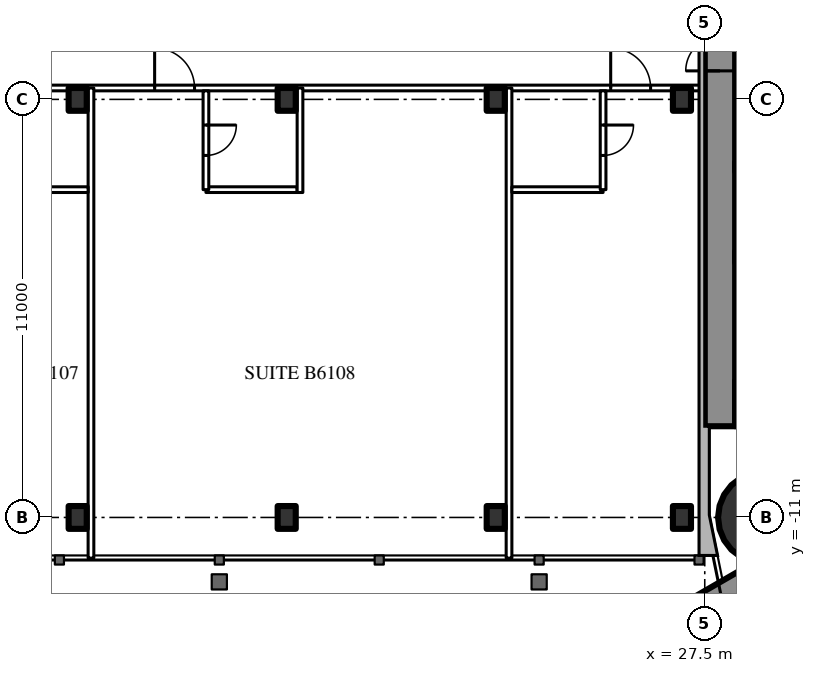
"""IFC4 building model, lengths in metres.
Left out: names, types, materials, properties, quantities, classifications, styles, units other than length and angle.
Written with IfcOpenShell. Run it as: python <this file> out.ifc"""

import sys

from ifc_helpers import new_model, si_unit, direction, frame, frame_2d, origin, origin_2d, place, context, subcontext, project, spatial, rectangle, circle, i_section, extrude, element, fill, save


model = new_model("IFC4")
c1 = context("Model", 3, precision=1e-05, world=origin(), true_north=direction((0.0, 1.0)))
c2 = subcontext(c1, "Body", "Model", "MODEL_VIEW")
j1 = project(units=[si_unit("LENGTHUNIT", "METRE"), si_unit("PLANEANGLEUNIT", "RADIAN")], contexts=[c1])
p1 = place(None, origin())
s1 = spatial("IfcSite", under=j1, at=p1, CompositionType="ELEMENT")
p2 = place(p1, origin())
s2 = spatial("IfcBuilding", under=s1, at=p2, CompositionType="ELEMENT")
p3 = place(p2, frame((0.0, 0.0, 229.7)))
s3 = spatial("IfcBuildingStorey", under=s2, at=p3, CompositionType="ELEMENT", Elevation=229.7)
p4 = place(p3, frame((29.05, -11.0, 0.0), z_axis=(0.0, 0.0, 1.0), x_axis=(1.0, 0.0, 0.0)))
e1 = element("IfcColumn", 1, at=p4, inside=s3, PredefinedType="COLUMN", context=c2, shape_type="SweptSolid", body=[
    extrude(circle(Radius=1.2, at=origin_2d()), origin(), (0.0, 0.0, 1.0), 3.6),
])
p5 = place(p3, frame((27.9, -8.6, 0.0), z_axis=(0.0, 0.0, 1.0), x_axis=(0.0, 1.0, 0.0)))
e2 = element("IfcWall", 2, at=p5, inside=s3, PredefinedType="SHEAR", context=c2, shape_type="SweptSolid", body=[
    extrude(rectangle(XDim=17.2, YDim=0.8, at=frame_2d((8.6, 0.0))), origin(), (0.0, 0.0, 1.0), 3.6),
])
p6 = place(p5, frame((9.35, 0.0, 0.0)))
e3 = element("IfcOpeningElement", 3, at=p6, cuts=e2, PredefinedType="OPENING", context=c2, shape_type="SweptSolid", body=[
    extrude(rectangle(XDim=0.9, YDim=2.2, at=frame_2d((0.45, 1.1))), frame((0.0, 0.41, 0.0), z_axis=(0.0, -1.0, 0.0), x_axis=(1.0, 0.0, 0.0)), (0.0, 0.0, 1.0), 0.82),
])
p7 = place(p3, frame((28.3, -8.0, 0.0), z_axis=(0.0, 0.0, 1.0), x_axis=(1.0, 0.0, 0.0)))
e4 = element("IfcWall", 4, at=p7, inside=s3, PredefinedType="SHEAR", context=c2, shape_type="SweptSolid", body=[
    extrude(rectangle(XDim=8.4, YDim=1.2, at=frame_2d((4.2, 0.0))), origin(), (0.0, 0.0, 1.0), 3.6),
])
p8 = place(p7, frame((0.25, 0.0, 0.0)))
e5 = element("IfcOpeningElement", 5, at=p8, cuts=e4, PredefinedType="OPENING", context=c2, shape_type="SweptSolid", body=[
    extrude(rectangle(XDim=1.0, YDim=2.2, at=frame_2d((0.5, 1.1))), frame((0.0, 0.61, 0.0), z_axis=(0.0, -1.0, 0.0), x_axis=(1.0, 0.0, 0.0)), (0.0, 0.0, 1.0), 1.22),
])
p9 = place(p3, frame((28.3, -4.15, 0.0), z_axis=(0.0, 0.0, 1.0), x_axis=(1.0, 0.0, 0.0)))
e6 = element("IfcWall", 6, at=p9, inside=s3, PredefinedType="SHEAR", context=c2, shape_type="SweptSolid", body=[
    extrude(rectangle(XDim=8.4, YDim=0.3, at=frame_2d((4.2, 0.0))), origin(), (0.0, 0.0, 1.0), 3.6),
])
p10 = place(p3, frame((28.3, -1.775, 0.0), z_axis=(0.0, 0.0, 1.0), x_axis=(1.0, 0.0, 0.0)))
e7 = element("IfcWall", 7, at=p10, inside=s3, PredefinedType="SHEAR", context=c2, shape_type="SweptSolid", body=[
    extrude(rectangle(XDim=2.9, YDim=0.25, at=frame_2d((1.45, 0.0))), origin(), (0.0, 0.0, 1.0), 3.6),
])
p11 = place(p3, frame((27.2, -13.8, 0.0), z_axis=(0.0, 0.0, 1.0), x_axis=(0.866027159892, 0.499996958321, 0.0)))
e8 = element("IfcWall", 8, at=p11, inside=s3, PredefinedType="SHEAR", context=c2, shape_type="SweptSolid", body=[
    extrude(rectangle(XDim=27.947, YDim=1.2, at=frame_2d((13.973, 0.0))), origin(), (0.0, 0.0, 1.0), 3.6),
])
p12 = place(p11, frame((4.6, 0.0, 0.0)))
e9 = element("IfcOpeningElement", 9, at=p12, cuts=e8, PredefinedType="OPENING", context=c2, shape_type="SweptSolid", body=[
    extrude(rectangle(XDim=1.0, YDim=2.2, at=frame_2d((0.5, 1.1))), frame((0.0, 0.61, 0.0), z_axis=(0.0, -1.0, 0.0), x_axis=(1.0, 0.0, 0.0)), (0.0, 0.0, 1.0), 1.22),
])
p13 = place(p11, frame((13.395, 0.0, 0.0)))
e10 = element("IfcOpeningElement", 10, at=p13, cuts=e8, PredefinedType="OPENING", context=c2, shape_type="SweptSolid", body=[
    extrude(rectangle(XDim=1.8, YDim=2.2, at=frame_2d((0.9, 1.1))), frame((0.0, 0.61, 0.0), z_axis=(0.0, -1.0, 0.0), x_axis=(1.0, 0.0, 0.0)), (0.0, 0.0, 1.0), 1.22),
])
p14 = place(p3, frame((27.2, 13.8, 0.0), z_axis=(0.0, 0.0, 1.0), x_axis=(0.866024515034, -0.500001539357, 0.0)))
e11 = element("IfcWall", 11, at=p14, inside=s3, PredefinedType="SHEAR", context=c2, shape_type="SweptSolid", body=[
    extrude(rectangle(XDim=26.907, YDim=1.2, at=frame_2d((13.454, 0.0))), origin(), (0.0, 0.0, 1.0), 3.6),
])
p15 = place(p14, frame((4.6, 0.0, 0.0)))
e12 = element("IfcOpeningElement", 12, at=p15, cuts=e11, PredefinedType="OPENING", context=c2, shape_type="SweptSolid", body=[
    extrude(rectangle(XDim=1.0, YDim=2.2, at=frame_2d((0.5, 1.1))), frame((0.0, 0.61, 0.0), z_axis=(0.0, -1.0, 0.0), x_axis=(1.0, 0.0, 0.0)), (0.0, 0.0, 1.0), 1.22),
])
p16 = place(p14, frame((13.395, 0.0, 0.0)))
e13 = element("IfcOpeningElement", 13, at=p16, cuts=e11, PredefinedType="OPENING", context=c2, shape_type="SweptSolid", body=[
    extrude(rectangle(XDim=1.8, YDim=2.2, at=frame_2d((0.9, 1.1))), frame((0.0, 0.61, 0.0), z_axis=(0.0, -1.0, 0.0), x_axis=(1.0, 0.0, 0.0)), (0.0, 0.0, 1.0), 1.22),
])
for number, where, z_axis, x_axis in (
    (14, (11.0, -11.0, 0.0), (0.0, 0.0, 1.0), (1.0, 0.0, 0.0)),
    (15, (16.5, -11.0, 0.0), (0.0, 0.0, 1.0), (1.0, 0.0, 0.0)),
    (16, (22.0, -11.0, 0.0), (0.0, 0.0, 1.0), (1.0, 0.0, 0.0)),
    (17, (26.9, -11.0, 0.0), (0.0, 0.0, 1.0), (1.0, 0.0, 0.0)),
    (18, (11.0, 0.0, 0.0), (0.0, 0.0, 1.0), (1.0, 0.0, 0.0)),
    (19, (16.5, 0.0, 0.0), (0.0, 0.0, 1.0), (1.0, 0.0, 0.0)),
    (20, (22.0, 0.0, 0.0), (0.0, 0.0, 1.0), (1.0, 0.0, 0.0)),
    (21, (26.9, 0.0, 0.0), (0.0, 0.0, 1.0), (1.0, 0.0, 0.0)),
):
    element("IfcColumn", number, at=place(p3, frame(where, z_axis=z_axis, x_axis=x_axis)), inside=s3, PredefinedType="COLUMN", context=c2, shape_type="SweptSolid", body=[
        extrude(i_section(OverallWidth=0.476, OverallDepth=0.6, WebThickness=0.1, FlangeThickness=0.14, FilletRadius=0.02, at=origin_2d()), origin(), (0.0, 0.0, 1.0), 3.6),
    ])
p17 = place(p3, frame((-27.5, 0.3, 0.0), z_axis=(0.0, 0.0, 1.0), x_axis=(1.0, 0.0, 0.0)))
e22 = element("IfcWall", 22, at=p17, inside=s3, PredefinedType="PARTITIONING", context=c2, shape_type="SweptSolid", body=[
    extrude(rectangle(XDim=55.0, YDim=0.15, at=frame_2d((27.5, 0.0))), origin(), (0.0, 0.0, 1.0), 2.4),
])
p18 = place(p17, frame((1.575, 0.0, 0.0)))
e23 = element("IfcOpeningElement", 23, at=p18, cuts=e22, PredefinedType="OPENING", context=c2, shape_type="SweptSolid", body=[
    extrude(rectangle(XDim=1.0, YDim=2.2, at=frame_2d((0.5, 1.1))), frame((0.0, 0.085, 0.0), z_axis=(0.0, -1.0, 0.0), x_axis=(1.0, 0.0, 0.0)), (0.0, 0.0, 1.0), 0.17),
])
p19 = place(p17, frame((7.525, 0.0, 0.0)))
e24 = element("IfcOpeningElement", 24, at=p19, cuts=e22, PredefinedType="OPENING", context=c2, shape_type="SweptSolid", body=[
    extrude(rectangle(XDim=1.05, YDim=2.4, at=frame_2d((0.525, 1.2))), frame((0.0, 0.085, 0.0), z_axis=(0.0, -1.0, 0.0), x_axis=(1.0, 0.0, 0.0)), (0.0, 0.0, 1.0), 0.17),
])
p20 = place(p17, frame((18.525, 0.0, 0.0)))
e25 = element("IfcOpeningElement", 25, at=p20, cuts=e22, PredefinedType="OPENING", context=c2, shape_type="SweptSolid", body=[
    extrude(rectangle(XDim=1.05, YDim=2.4, at=frame_2d((0.525, 1.2))), frame((0.0, 0.085, 0.0), z_axis=(0.0, -1.0, 0.0), x_axis=(1.0, 0.0, 0.0)), (0.0, 0.0, 1.0), 0.17),
])
p21 = place(p17, frame((24.025, 0.0, 0.0)))
e26 = element("IfcOpeningElement", 26, at=p21, cuts=e22, PredefinedType="OPENING", context=c2, shape_type="SweptSolid", body=[
    extrude(rectangle(XDim=1.05, YDim=2.4, at=frame_2d((0.525, 1.2))), frame((0.0, 0.085, 0.0), z_axis=(0.0, -1.0, 0.0), x_axis=(1.0, 0.0, 0.0)), (0.0, 0.0, 1.0), 0.17),
])
p22 = place(p17, frame((35.025, 0.0, 0.0)))
e27 = element("IfcOpeningElement", 27, at=p22, cuts=e22, PredefinedType="OPENING", context=c2, shape_type="SweptSolid", body=[
    extrude(rectangle(XDim=1.05, YDim=2.4, at=frame_2d((0.525, 1.2))), frame((0.0, 0.085, 0.0), z_axis=(0.0, -1.0, 0.0), x_axis=(1.0, 0.0, 0.0)), (0.0, 0.0, 1.0), 0.17),
])
p23 = place(p17, frame((40.525, 0.0, 0.0)))
e28 = element("IfcOpeningElement", 28, at=p23, cuts=e22, PredefinedType="OPENING", context=c2, shape_type="SweptSolid", body=[
    extrude(rectangle(XDim=1.05, YDim=2.4, at=frame_2d((0.525, 1.2))), frame((0.0, 0.085, 0.0), z_axis=(0.0, -1.0, 0.0), x_axis=(1.0, 0.0, 0.0)), (0.0, 0.0, 1.0), 0.17),
])
p24 = place(p17, frame((52.525, 0.0, 0.0)))
e29 = element("IfcOpeningElement", 29, at=p24, cuts=e22, PredefinedType="OPENING", context=c2, shape_type="SweptSolid", body=[
    extrude(rectangle(XDim=1.05, YDim=2.4, at=frame_2d((0.525, 1.2))), frame((0.0, 0.085, 0.0), z_axis=(0.0, -1.0, 0.0), x_axis=(1.0, 0.0, 0.0)), (0.0, 0.0, 1.0), 0.17),
])
for number, where, z_axis, x_axis in (
    (30, (11.35, -12.07, 0.0), (0.0, 0.0, 1.0), (0.0, 1.0, 0.0)),
    (31, (22.35, -12.07, 0.0), (0.0, 0.0, 1.0), (0.0, 1.0, 0.0)),
):
    element("IfcWall", number, at=place(p3, frame(where, z_axis=z_axis, x_axis=x_axis)), inside=s3, PredefinedType="PARTITIONING", context=c2, shape_type="SweptSolid", body=[
        extrude(rectangle(XDim=12.37, YDim=0.15, at=frame_2d((6.185, 0.0))), origin(), (0.0, 0.0, 1.0), 3.4),
    ])
for number, where, z_axis, x_axis in (
    (32, (8.875, -2.375, 0.0), (0.0, 0.0, 1.0), (1.0, 0.0, 0.0)),
    (33, (14.375, -2.375, 0.0), (0.0, 0.0, 1.0), (1.0, 0.0, 0.0)),
):
    element("IfcWall", number, at=place(p3, frame(where, z_axis=z_axis, x_axis=x_axis)), inside=s3, PredefinedType="PARTITIONING", context=c2, shape_type="SweptSolid", body=[
        extrude(rectangle(XDim=2.4, YDim=0.15, at=frame_2d((1.2, 0.0))), origin(), (0.0, 0.0, 1.0), 3.4),
    ])
p25 = place(p3, frame((14.375, -2.375, 0.0), z_axis=(0.0, 0.0, 1.0), x_axis=(0.0, 1.0, 0.0)))
e34 = element("IfcWall", 34, at=p25, inside=s3, PredefinedType="PARTITIONING", context=c2, shape_type="SweptSolid", body=[
    extrude(rectangle(XDim=2.6, YDim=0.15, at=frame_2d((1.3, 0.0))), origin(), (0.0, 0.0, 1.0), 3.4),
])
p26 = place(p25, frame((0.9, 0.0, 0.0)))
e35 = element("IfcOpeningElement", 35, at=p26, cuts=e34, PredefinedType="OPENING", context=c2, shape_type="SweptSolid", body=[
    extrude(rectangle(XDim=0.8, YDim=2.2, at=frame_2d((0.4, 1.1))), frame((0.0, 0.085, 0.0), z_axis=(0.0, -1.0, 0.0), x_axis=(1.0, 0.0, 0.0)), (0.0, 0.0, 1.0), 0.17),
])
p27 = place(p3, frame((22.425, -2.375, 0.0), z_axis=(0.0, 0.0, 1.0), x_axis=(1.0, 0.0, 0.0)))
e36 = element("IfcWall", 36, at=p27, inside=s3, PredefinedType="PARTITIONING", context=c2, shape_type="SweptSolid", body=[
    extrude(rectangle(XDim=2.4, YDim=0.15, at=frame_2d((1.2, 0.0))), origin(), (0.0, 0.0, 1.0), 3.4),
])
p28 = place(p3, frame((24.825, -2.375, 0.0), z_axis=(0.0, 0.0, 1.0), x_axis=(0.0, 1.0, 0.0)))
e37 = element("IfcWall", 37, at=p28, inside=s3, PredefinedType="PARTITIONING", context=c2, shape_type="SweptSolid", body=[
    extrude(rectangle(XDim=2.6, YDim=0.15, at=frame_2d((1.3, 0.0))), origin(), (0.0, 0.0, 1.0), 3.4),
])
p29 = place(p28, frame((0.9, 0.0, 0.0)))
e38 = element("IfcOpeningElement", 38, at=p29, cuts=e37, PredefinedType="OPENING", context=c2, shape_type="SweptSolid", body=[
    extrude(rectangle(XDim=0.8, YDim=2.2, at=frame_2d((0.4, 1.1))), frame((0.0, 0.085, 0.0), z_axis=(0.0, -1.0, 0.0), x_axis=(1.0, 0.0, 0.0)), (0.0, 0.0, 1.0), 0.17),
])
p30 = place(p3, frame((16.85, -2.45, 0.0), z_axis=(0.0, 0.0, 1.0), x_axis=(0.0, 1.0, 0.0)))
e39 = element("IfcWall", 39, at=p30, inside=s3, PredefinedType="PARTITIONING", context=c2, shape_type="SweptSolid", body=[
    extrude(rectangle(XDim=2.75, YDim=0.15, at=frame_2d((1.375, 0.0))), origin(), (0.0, 0.0, 1.0), 3.4),
])
p31 = place(p6, origin())
e40 = element("IfcDoor", 40, at=p31, inside=s3, OperationType="SINGLE_SWING_LEFT", PredefinedType="DOOR", context=c2, shape_type="SweptSolid", body=[
    extrude(rectangle(XDim=0.9, YDim=2.2, at=frame_2d((0.45, 1.1))), frame((0.0, 0.025, 0.0), z_axis=(0.0, -1.0, 0.0), x_axis=(1.0, 0.0, 0.0)), (0.0, 0.0, 1.0), 0.05),
])
fill(e3, e40)
p32 = place(p26, origin())
e41 = element("IfcDoor", 41, at=p32, inside=s3, OperationType="SINGLE_SWING_RIGHT", PredefinedType="DOOR", context=c2, shape_type="SweptSolid", body=[
    extrude(rectangle(XDim=0.8, YDim=2.2, at=frame_2d((0.4, 1.1))), frame((0.0, 0.025, 0.0), z_axis=(0.0, -1.0, 0.0), x_axis=(1.0, 0.0, 0.0)), (0.0, 0.0, 1.0), 0.05),
])
fill(e35, e41)
p33 = place(p23, origin())
e42 = element("IfcDoor", 42, at=p33, inside=s3, OperationType="SINGLE_SWING_LEFT", PredefinedType="DOOR", context=c2, shape_type="SweptSolid", body=[
    extrude(rectangle(XDim=1.05, YDim=2.4, at=frame_2d((0.525, 1.2))), frame((0.0, 0.025, 0.0), z_axis=(0.0, -1.0, 0.0), x_axis=(1.0, 0.0, 0.0)), (0.0, 0.0, 1.0), 0.05),
])
fill(e28, e42)
p34 = place(p29, origin())
e43 = element("IfcDoor", 43, at=p34, inside=s3, OperationType="SINGLE_SWING_RIGHT", PredefinedType="DOOR", context=c2, shape_type="SweptSolid", body=[
    extrude(rectangle(XDim=0.8, YDim=2.2, at=frame_2d((0.4, 1.1))), frame((0.0, 0.025, 0.0), z_axis=(0.0, -1.0, 0.0), x_axis=(1.0, 0.0, 0.0)), (0.0, 0.0, 1.0), 0.05),
])
fill(e38, e43)
p35 = place(p24, origin())
e44 = element("IfcDoor", 44, at=p35, inside=s3, OperationType="SINGLE_SWING_LEFT", PredefinedType="DOOR", context=c2, shape_type="SweptSolid", body=[
    extrude(rectangle(XDim=1.05, YDim=2.4, at=frame_2d((0.525, 1.2))), frame((0.0, 0.025, 0.0), z_axis=(0.0, -1.0, 0.0), x_axis=(1.0, 0.0, 0.0)), (0.0, 0.0, 1.0), 0.05),
])
fill(e29, e44)
save(model, sys.argv[1])
